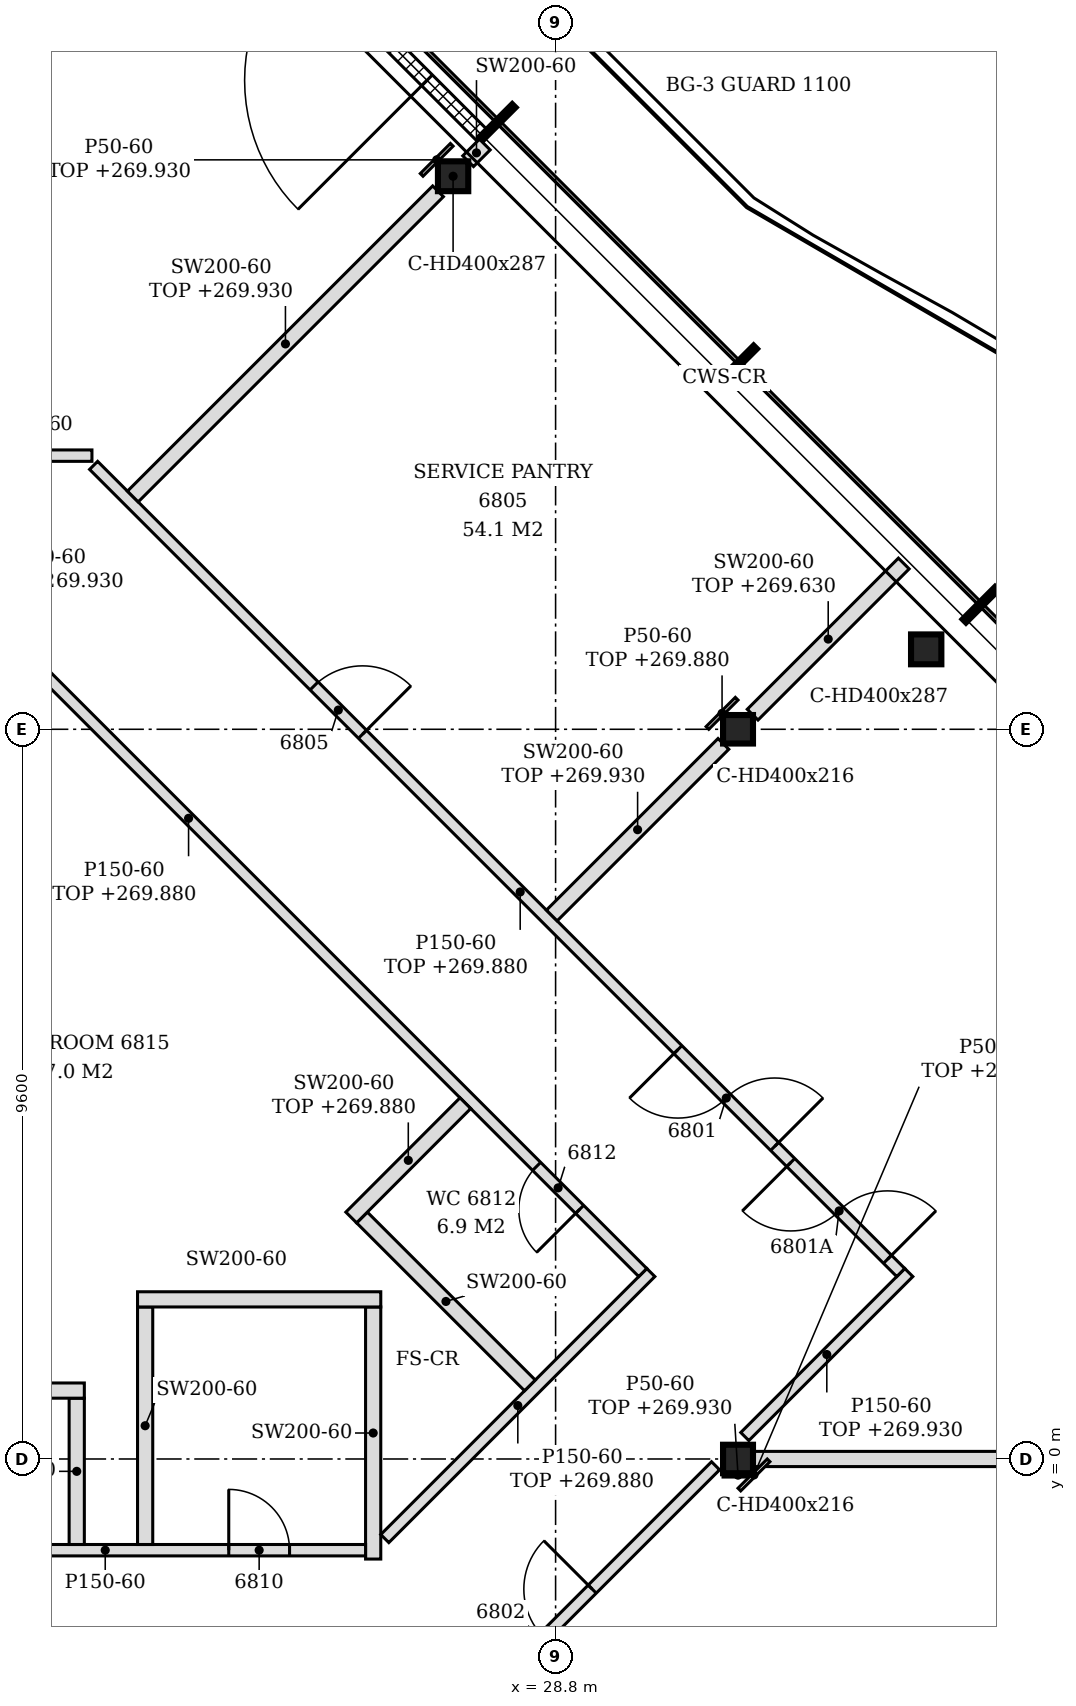
"""IFC4 building model, lengths in metres.
Left out: names, types, materials, properties, quantities, classifications, styles, units other than length and angle.
Written with IfcOpenShell. Run it as: python <this file> out.ifc"""

import sys

from ifc_helpers import new_model, si_unit, direction, frame, frame_2d, origin, origin_2d, place, context, subcontext, project, spatial, polyline, rectangle, i_section, outline, extrude, element, fill, save


model = new_model("IFC4")
c1 = context("Model", 3, precision=1e-05, world=origin(), true_north=direction((0.0, 1.0)))
c2 = subcontext(c1, "Body", "Model", "MODEL_VIEW")
j1 = project(units=[si_unit("LENGTHUNIT", "METRE"), si_unit("PLANEANGLEUNIT", "RADIAN")], contexts=[c1])
p1 = place(None, origin())
s1 = spatial("IfcSite", under=j1, at=p1, CompositionType="ELEMENT")
p2 = place(p1, origin())
s2 = spatial("IfcBuilding", under=s1, at=p2, CompositionType="ELEMENT")
p3 = place(p2, frame((0.0, 0.0, 267.0)))
s3 = spatial("IfcBuildingStorey", under=s2, at=p3, CompositionType="ELEMENT", Elevation=267.0)
for number, where, z_axis, x_axis in (
    (1, (33.676, 10.652, -0.15), (0.0, 0.0, 1.0), (1.0, 0.0, 0.0)),
    (2, (27.451, 16.876, -0.15), (0.0, 0.0, 1.0), (1.0, 0.0, 0.0)),
):
    element("IfcColumn", number, at=place(p3, frame(where, z_axis=z_axis, x_axis=x_axis)), inside=s3, PredefinedType="COLUMN", context=c2, shape_type="SweptSolid", body=[
        extrude(i_section(OverallWidth=0.399, OverallDepth=0.393, WebThickness=0.023, FlangeThickness=0.037, FilletRadius=0.015, at=origin_2d()), origin(), (0.0, 0.0, 1.0), 3.6),
    ])
for number, where, z_axis, x_axis in (
    (3, (31.2, 0.0, -0.15), (0.0, 0.0, 1.0), (1.0, 0.0, 0.0)),
    (4, (31.2, 9.6, -0.15), (0.0, 0.0, 1.0), (1.0, 0.0, 0.0)),
):
    element("IfcColumn", number, at=place(p3, frame(where, z_axis=z_axis, x_axis=x_axis)), inside=s3, PredefinedType="COLUMN", context=c2, shape_type="SweptSolid", body=[
        extrude(i_section(OverallWidth=0.394, OverallDepth=0.375, WebThickness=0.017, FlangeThickness=0.028, FilletRadius=0.015, at=origin_2d()), origin(), (0.0, 0.0, 1.0), 3.6),
    ])
p4 = place(p3, frame((27.826, 17.42, 0.0), z_axis=(0.0, 0.0, 1.0), x_axis=(-0.707079231393, 0.707134329907, 0.0)))
e5 = element("IfcWall", 5, at=p4, inside=s3, PredefinedType="NOTDEFINED", context=c2, shape_type="SweptSolid", body=[
    extrude(rectangle(XDim=4.431, YDim=0.2, at=frame_2d((2.215, 0.0))), origin(), (0.0, 0.0, 1.0), 3.45),
])
p5 = place(p4, frame((1.015, 0.0, 0.0)))
e6 = element("IfcOpeningElement", 6, at=p5, cuts=e5, PredefinedType="OPENING", context=c2, shape_type="SweptSolid", body=[
    extrude(rectangle(XDim=2.4, YDim=2.4, at=frame_2d((1.2, 1.2))), frame((0.0, 0.11, 0.0), z_axis=(0.0, -1.0, 0.0), x_axis=(1.0, 0.0, 0.0)), (0.0, 0.0, 1.0), 0.22),
])
p6 = place(p3, frame((14.322, -16.672, 0.0), z_axis=(0.0, 0.0, 1.0), x_axis=(0.707106781187, 0.707106781187, 0.0)))
e7 = element("IfcWall", 7, at=p6, inside=s3, PredefinedType="PARTITIONING", context=c2, shape_type="SweptSolid", body=[
    extrude(rectangle(XDim=23.452, YDim=0.15, at=frame_2d((11.726, 0.0))), origin(), (0.0, 0.0, 1.0), 2.73),
])
p7 = place(p6, frame((19.357, 0.0, 0.0)))
e8 = element("IfcOpeningElement", 8, at=p7, cuts=e7, PredefinedType="OPENING", context=c2, shape_type="SweptSolid", body=[
    extrude(rectangle(XDim=1.8, YDim=2.1, at=frame_2d((0.9, 1.05))), frame((0.0, 0.085, 0.0), z_axis=(0.0, -1.0, 0.0), x_axis=(1.0, 0.0, 0.0)), (0.0, 0.0, 1.0), 0.17),
])
p8 = place(p6, frame((2.975, 0.0, 0.0)))
e9 = element("IfcOpeningElement", 9, at=p8, cuts=e7, PredefinedType="OPENING", context=c2, shape_type="SweptSolid", body=[
    extrude(rectangle(XDim=0.9, YDim=2.1, at=frame_2d((0.45, 1.05))), frame((0.0, 0.085, 0.0), z_axis=(0.0, -1.0, 0.0), x_axis=(1.0, 0.0, 0.0)), (0.0, 0.0, 1.0), 0.17),
])
p9 = place(p6, frame((12.587, 0.0, 0.0)))
e10 = element("IfcOpeningElement", 10, at=p9, cuts=e7, PredefinedType="OPENING", context=c2, shape_type="SweptSolid", body=[
    extrude(rectangle(XDim=0.9, YDim=2.1, at=frame_2d((0.45, 1.05))), frame((0.0, 0.085, 0.0), z_axis=(0.0, -1.0, 0.0), x_axis=(1.0, 0.0, 0.0)), (0.0, 0.0, 1.0), 0.17),
])
p10 = place(p3, frame((26.4, -1.316, 0.0), z_axis=(0.0, 0.0, 1.0), x_axis=(0.0, 1.0, 0.0)))
e11 = element("IfcWall", 11, at=p10, inside=s3, PredefinedType="PARTITIONING", context=c2, shape_type="SweptSolid", body=[
    extrude(outline(polyline([(0.0, 0.0), (3.316, 0.0), (3.316, 3.45), (1.421, 3.45), (1.419, 2.88), (1.211, 2.88), (1.209, 3.45), (0.0, 3.45), (0.0, 0.0)])), frame((0.0, 0.1, 0.0), z_axis=(0.0, -1.0, 0.0), x_axis=(1.0, 0.0, 0.0)), (0.0, 0.0, 1.0), 0.2),
])
p11 = place(p3, frame((19.125, -1.2, 0.0), z_axis=(0.0, 0.0, 1.0), x_axis=(1.0, 0.0, 0.0)))
e12 = element("IfcWall", 12, at=p11, inside=s3, PredefinedType="PARTITIONING", context=c2, shape_type="SweptSolid", body=[
    extrude(outline(polyline([(0.0, 0.0), (7.175, 0.0), (7.175, 3.45), (0.225, 3.45), (0.223, 2.83), (0.0, 2.83), (0.0, 0.0)])), frame((0.0, 0.075, 0.0), z_axis=(0.0, -1.0, 0.0), x_axis=(1.0, 0.0, 0.0)), (0.0, 0.0, 1.0), 0.15),
])
p12 = place(p11, frame((5.375, 0.0, 0.0)))
e13 = element("IfcOpeningElement", 13, at=p12, cuts=e12, PredefinedType="OPENING", context=c2, shape_type="SweptSolid", body=[
    extrude(rectangle(XDim=0.8, YDim=2.1, at=frame_2d((0.4, 1.05))), frame((0.0, 0.085, 0.0), z_axis=(0.0, -1.0, 0.0), x_axis=(1.0, 0.0, 0.0)), (0.0, 0.0, 1.0), 0.17),
])
p13 = place(p11, frame((1.325, 0.0, 0.0)))
e14 = element("IfcOpeningElement", 14, at=p13, cuts=e12, PredefinedType="OPENING", context=c2, shape_type="SweptSolid", body=[
    extrude(rectangle(XDim=0.8, YDim=2.1, at=frame_2d((0.4, 1.05))), frame((0.0, 0.085, 0.0), z_axis=(0.0, -1.0, 0.0), x_axis=(1.0, 0.0, 0.0)), (0.0, 0.0, 1.0), 0.17),
])
p14 = place(p3, frame((22.5, -1.125, 0.0), z_axis=(0.0, 0.0, 1.0), x_axis=(0.0, 1.0, 0.0)))
e15 = element("IfcWall", 15, at=p14, inside=s3, PredefinedType="PARTITIONING", context=c2, shape_type="SweptSolid", body=[
    extrude(outline(polyline([(0.0, 0.0), (1.925, 0.0), (1.925, 3.45), (1.23, 3.45), (1.228, 2.88), (1.02, 2.88), (1.018, 3.45), (0.0, 3.45), (0.0, 0.0)])), frame((0.0, 0.1, 0.0), z_axis=(0.0, -1.0, 0.0), x_axis=(1.0, 0.0, 0.0)), (0.0, 0.0, 1.0), 0.2),
])
p15 = place(p3, frame((23.4, -1.125, 0.0), z_axis=(0.0, 0.0, 1.0), x_axis=(0.0, 1.0, 0.0)))
e16 = element("IfcWall", 16, at=p15, inside=s3, PredefinedType="PARTITIONING", context=c2, shape_type="SweptSolid", body=[
    extrude(outline(polyline([(0.0, 0.0), (3.125, 0.0), (3.125, 3.45), (1.23, 3.45), (1.228, 2.88), (1.02, 2.88), (1.018, 3.45), (0.0, 3.45), (0.0, 0.0)])), frame((0.0, 0.1, 0.0), z_axis=(0.0, -1.0, 0.0), x_axis=(1.0, 0.0, 0.0)), (0.0, 0.0, 1.0), 0.2),
])
p16 = place(p3, frame((26.553, -1.047, 0.0), z_axis=(0.0, 0.0, 1.0), x_axis=(0.707106781187, 0.707106781187, 0.0)))
e17 = element("IfcWall", 17, at=p16, inside=s3, PredefinedType="PARTITIONING", context=c2, shape_type="SweptSolid", body=[
    extrude(rectangle(XDim=4.95, YDim=0.15, at=frame_2d((2.475, 0.0))), origin(), (0.0, 0.0, 1.0), 2.88),
])
p17 = place(p3, frame((31.397, 0.0, 0.0), z_axis=(0.0, 0.0, 1.0), x_axis=(1.0, 0.0, 0.0)))
e18 = element("IfcWall", 18, at=p17, inside=s3, PredefinedType="PARTITIONING", context=c2, shape_type="SweptSolid", body=[
    extrude(outline(polyline([(0.0, 0.0), (9.053, 0.0), (9.053, 2.98), (8.653, 2.98), (8.651, 2.93), (8.353, 2.93), (8.351, 2.98), (0.0, 2.98), (0.0, 0.0)])), frame((0.0, 0.1, 0.0), z_axis=(0.0, -1.0, 0.0), x_axis=(1.0, 0.0, 0.0)), (0.0, 0.0, 1.0), 0.2),
])
p18 = place(p3, frame((31.289, 0.295, 0.0), z_axis=(0.0, 0.0, 1.0), x_axis=(0.707146786096, 0.707066774014, 0.0)))
e19 = element("IfcWall", 19, at=p18, inside=s3, PredefinedType="PARTITIONING", context=c2, shape_type="SweptSolid", body=[
    extrude(rectangle(XDim=3.051, YDim=0.15, at=frame_2d((1.526, 0.0))), origin(), (0.0, 0.0, 1.0), 2.93),
])
p19 = place(p3, frame((19.275, 0.9, 0.0), z_axis=(0.0, 0.0, 1.0), x_axis=(1.0, 0.0, 0.0)))
e20 = element("IfcWall", 20, at=p19, inside=s3, PredefinedType="PARTITIONING", context=c2, shape_type="SweptSolid", body=[
    extrude(outline(polyline([(0.0, 0.0), (3.325, 0.0), (3.325, 3.45), (0.075, 3.45), (0.073, 2.83), (0.0, 2.83), (0.0, 0.0)])), frame((0.0, 0.1, 0.0), z_axis=(0.0, -1.0, 0.0), x_axis=(1.0, 0.0, 0.0)), (0.0, 0.0, 1.0), 0.2),
])
p20 = place(p3, frame((28.462, 0.968, 0.0), z_axis=(0.0, 0.0, 1.0), x_axis=(-0.707106781187, 0.707106781187, 0.0)))
e21 = element("IfcWall", 21, at=p20, inside=s3, PredefinedType="PARTITIONING", context=c2, shape_type="SweptSolid", body=[
    extrude(rectangle(XDim=3.124, YDim=0.2, at=frame_2d((1.562, 0.0))), origin(), (0.0, 0.0, 1.0), 3.45),
])
p21 = place(p3, frame((23.3, 2.1, 0.0), z_axis=(0.0, 0.0, 1.0), x_axis=(1.0, 0.0, 0.0)))
e22 = element("IfcWall", 22, at=p21, inside=s3, PredefinedType="PARTITIONING", context=c2, shape_type="SweptSolid", body=[
    extrude(rectangle(XDim=3.2, YDim=0.2, at=frame_2d((1.6, 0.0))), origin(), (0.0, 0.0, 1.0), 3.45),
])
p22 = place(p3, frame((29.947, 2.453, 0.0), z_axis=(0.0, 0.0, 1.0), x_axis=(-0.707098603185, 0.707114959093, 0.0)))
e23 = element("IfcWall", 23, at=p22, inside=s3, PredefinedType="PARTITIONING", context=c2, shape_type="SweptSolid", body=[
    extrude(rectangle(XDim=14.927, YDim=0.15, at=frame_2d((7.463, 0.0))), origin(), (0.0, 0.0, 1.0), 2.88),
])
p23 = place(p22, frame((1.175, 0.0, 0.0)))
e24 = element("IfcOpeningElement", 24, at=p23, cuts=e23, PredefinedType="OPENING", context=c2, shape_type="SweptSolid", body=[
    extrude(rectangle(XDim=0.8, YDim=2.1, at=frame_2d((0.4, 1.05))), frame((0.0, 0.085, 0.0), z_axis=(0.0, -1.0, 0.0), x_axis=(1.0, 0.0, 0.0)), (0.0, 0.0, 1.0), 0.17),
])
p24 = place(p3, frame((33.341, 2.453, 0.0), z_axis=(0.0, 0.0, 1.0), x_axis=(-0.707098652635, 0.707114909645, 0.0)))
e25 = element("IfcWall", 25, at=p24, inside=s3, PredefinedType="PARTITIONING", context=c2, shape_type="SweptSolid", body=[
    extrude(rectangle(XDim=15.018, YDim=0.15, at=frame_2d((7.509, 0.0))), origin(), (0.0, 0.0, 1.0), 2.88),
])
p25 = place(p24, frame((2.347, 0.0, 0.0)))
e26 = element("IfcOpeningElement", 26, at=p25, cuts=e25, PredefinedType="OPENING", context=c2, shape_type="SweptSolid", body=[
    extrude(rectangle(XDim=1.8, YDim=2.1, at=frame_2d((0.9, 1.05))), frame((0.0, 0.085, 0.0), z_axis=(0.0, -1.0, 0.0), x_axis=(1.0, 0.0, 0.0)), (0.0, 0.0, 1.0), 0.17),
])
p26 = place(p24, frame((0.247, 0.0, 0.0)))
e27 = element("IfcOpeningElement", 27, at=p26, cuts=e25, PredefinedType="OPENING", context=c2, shape_type="SweptSolid", body=[
    extrude(rectangle(XDim=1.8, YDim=2.1, at=frame_2d((0.9, 1.05))), frame((0.0, 0.085, 0.0), z_axis=(0.0, -1.0, 0.0), x_axis=(1.0, 0.0, 0.0)), (0.0, 0.0, 1.0), 0.17),
])
p27 = place(p24, frame((10.015, 0.0, 0.0)))
e28 = element("IfcOpeningElement", 28, at=p27, cuts=e25, PredefinedType="OPENING", context=c2, shape_type="SweptSolid", body=[
    extrude(rectangle(XDim=0.9, YDim=2.1, at=frame_2d((0.45, 1.05))), frame((0.0, 0.085, 0.0), z_axis=(0.0, -1.0, 0.0), x_axis=(1.0, 0.0, 0.0)), (0.0, 0.0, 1.0), 0.17),
])
p28 = place(p3, frame((26.111, 3.177, 0.0), z_axis=(0.0, 0.0, 1.0), x_axis=(0.70658957541, 0.707623608935, 0.0)))
e29 = element("IfcWall", 29, at=p28, inside=s3, PredefinedType="PARTITIONING", context=c2, shape_type="SweptSolid", body=[
    extrude(rectangle(XDim=2.125, YDim=0.2, at=frame_2d((1.062, 0.0))), origin(), (0.0, 0.0, 1.0), 2.88),
])
p29 = place(p3, frame((28.75, 7.15, 0.0), z_axis=(0.0, 0.0, 1.0), x_axis=(0.707106781187, 0.707106781187, 0.0)))
e30 = element("IfcWall", 30, at=p29, inside=s3, PredefinedType="PARTITIONING", context=c2, shape_type="SweptSolid", body=[
    extrude(rectangle(XDim=3.193, YDim=0.2, at=frame_2d((1.597, 0.0))), origin(), (0.0, 0.0, 1.0), 2.93),
])
p30 = place(p3, frame((31.392, 9.792, 0.0), z_axis=(0.0, 0.0, 1.0), x_axis=(0.707106781187, 0.707106781187, 0.0)))
e31 = element("IfcWall", 31, at=p30, inside=s3, PredefinedType="PARTITIONING", context=c2, shape_type="SweptSolid", body=[
    extrude(rectangle(XDim=2.812, YDim=0.2, at=frame_2d((1.406, 0.0))), origin(), (0.0, 0.0, 1.0), 2.63),
])
p31 = place(p3, frame((23.238, 12.662, 0.0), z_axis=(0.0, 0.0, 1.0), x_axis=(0.707128276734, 0.707085284986, 0.0)))
e32 = element("IfcWall", 32, at=p31, inside=s3, PredefinedType="PARTITIONING", context=c2, shape_type="SweptSolid", body=[
    extrude(rectangle(XDim=5.679, YDim=0.2, at=frame_2d((2.839, 0.0))), origin(), (0.0, 0.0, 1.0), 2.93),
])
p32 = place(p3, frame((19.397, 13.2, 0.0), z_axis=(0.0, 0.0, 1.0), x_axis=(1.0, 0.0, 0.0)))
e33 = element("IfcWall", 33, at=p32, inside=s3, PredefinedType="PARTITIONING", context=c2, shape_type="SweptSolid", body=[
    extrude(rectangle(XDim=3.303, YDim=0.15, at=frame_2d((1.652, 0.0))), origin(), (0.0, 0.0, 1.0), 3.45),
])
p33 = place(p32, frame((1.05, 0.0, 0.0)))
e34 = element("IfcOpeningElement", 34, at=p33, cuts=e33, PredefinedType="OPENING", context=c2, shape_type="SweptSolid", body=[
    extrude(rectangle(XDim=0.9, YDim=2.1, at=frame_2d((0.45, 1.05))), frame((0.0, 0.085, 0.0), z_axis=(0.0, -1.0, 0.0), x_axis=(1.0, 0.0, 0.0)), (0.0, 0.0, 1.0), 0.17),
])
p34 = place(p3, frame((27.65, 17.073, 0.0), z_axis=(0.0, 0.0, 1.0), x_axis=(0.707106781187, 0.707106781187, 0.0)))
e35 = element("IfcWall", 35, at=p34, inside=s3, PredefinedType="PARTITIONING", context=c2, shape_type="SweptSolid", body=[
    extrude(rectangle(XDim=0.31, YDim=0.2, at=frame_2d((0.155, 0.0))), origin(), (0.0, 0.0, 1.0), 3.45),
])
p35 = place(p3, frame((31.218, -0.402, 0.0), z_axis=(0.0, 0.0, 1.0), x_axis=(0.707106781187, 0.707106781187, 0.0)))
e36 = element("IfcWall", 36, at=p35, inside=s3, PredefinedType="PARTITIONING", context=c2, shape_type="SweptSolid", body=[
    extrude(rectangle(XDim=0.544, YDim=0.05, at=frame_2d((0.272, 0.0))), origin(), (0.0, 0.0, 1.0), 2.93),
])
p36 = place(p3, frame((31.003, -0.212, 0.0), z_axis=(0.0, 0.0, 1.0), x_axis=(1.0, 0.0, 0.0)))
e37 = element("IfcWall", 37, at=p36, inside=s3, PredefinedType="PARTITIONING", context=c2, shape_type="SweptSolid", body=[
    extrude(rectangle(XDim=0.394, YDim=0.05, at=frame_2d((0.197, 0.0))), origin(), (0.0, 0.0, 1.0), 2.93),
])
p37 = place(p3, frame((30.798, 9.618, 0.0), z_axis=(0.0, 0.0, 1.0), x_axis=(0.707106781187, 0.707106781187, 0.0)))
e38 = element("IfcWall", 38, at=p37, inside=s3, PredefinedType="PARTITIONING", context=c2, shape_type="SweptSolid", body=[
    extrude(rectangle(XDim=0.544, YDim=0.05, at=frame_2d((0.272, 0.0))), origin(), (0.0, 0.0, 1.0), 2.88),
])
p38 = place(p3, frame((27.038, 16.893, 0.0), z_axis=(0.0, 0.0, 1.0), x_axis=(0.707106781187, 0.707106781187, 0.0)))
e39 = element("IfcWall", 39, at=p38, inside=s3, PredefinedType="PARTITIONING", context=c2, shape_type="SweptSolid", body=[
    extrude(rectangle(XDim=0.56, YDim=0.05, at=frame_2d((0.28, 0.0))), origin(), (0.0, 0.0, 1.0), 2.93),
])
p39 = place(p5, origin())
e40 = element("IfcDoor", 40, at=p39, inside=s3, OperationType="SINGLE_SWING_LEFT", PredefinedType="DOOR", context=c2, shape_type="SweptSolid", body=[
    extrude(rectangle(XDim=2.4, YDim=2.4, at=frame_2d((1.2, 1.2))), frame((0.0, 0.025, 0.0), z_axis=(0.0, -1.0, 0.0), x_axis=(1.0, 0.0, 0.0)), (0.0, 0.0, 1.0), 0.05),
])
fill(e6, e40)
p40 = place(p25, frame((1.8, 0.0, 0.0), z_axis=(0.0, 0.0, 1.0), x_axis=(-1.0, 0.0, 0.0)))
e41 = element("IfcDoor", 41, at=p40, inside=s3, OperationType="DOUBLE_DOOR_SINGLE_SWING", PredefinedType="DOOR", context=c2, shape_type="SweptSolid", body=[
    extrude(rectangle(XDim=1.8, YDim=2.1, at=frame_2d((0.9, 1.05))), frame((0.0, 0.025, 0.0), z_axis=(0.0, -1.0, 0.0), x_axis=(1.0, 0.0, 0.0)), (0.0, 0.0, 1.0), 0.05),
])
fill(e26, e41)
p41 = place(p26, frame((1.8, 0.0, 0.0), z_axis=(0.0, 0.0, 1.0), x_axis=(-1.0, 0.0, 0.0)))
e42 = element("IfcDoor", 42, at=p41, inside=s3, OperationType="DOUBLE_DOOR_SINGLE_SWING", PredefinedType="DOOR", context=c2, shape_type="SweptSolid", body=[
    extrude(rectangle(XDim=1.8, YDim=2.1, at=frame_2d((0.9, 1.05))), frame((0.0, 0.025, 0.0), z_axis=(0.0, -1.0, 0.0), x_axis=(1.0, 0.0, 0.0)), (0.0, 0.0, 1.0), 0.05),
])
fill(e27, e42)
p42 = place(p7, frame((1.8, 0.0, 0.0), z_axis=(0.0, 0.0, 1.0), x_axis=(-1.0, 0.0, 0.0)))
e43 = element("IfcDoor", 43, at=p42, inside=s3, OperationType="DOUBLE_DOOR_SINGLE_SWING", PredefinedType="DOOR", context=c2, shape_type="SweptSolid", body=[
    extrude(rectangle(XDim=1.8, YDim=2.1, at=frame_2d((0.9, 1.05))), frame((0.0, 0.025, 0.0), z_axis=(0.0, -1.0, 0.0), x_axis=(1.0, 0.0, 0.0)), (0.0, 0.0, 1.0), 0.05),
])
fill(e8, e43)
p43 = place(p27, frame((0.9, 0.0, 0.0), z_axis=(0.0, 0.0, 1.0), x_axis=(-1.0, 0.0, 0.0)))
e44 = element("IfcDoor", 44, at=p43, inside=s3, OperationType="SINGLE_SWING_RIGHT", PredefinedType="DOOR", context=c2, shape_type="SweptSolid", body=[
    extrude(rectangle(XDim=0.9, YDim=2.1, at=frame_2d((0.45, 1.05))), frame((0.0, 0.025, 0.0), z_axis=(0.0, -1.0, 0.0), x_axis=(1.0, 0.0, 0.0)), (0.0, 0.0, 1.0), 0.05),
])
fill(e28, e44)
p44 = place(p12, origin())
e45 = element("IfcDoor", 45, at=p44, inside=s3, OperationType="SINGLE_SWING_LEFT", PredefinedType="DOOR", context=c2, shape_type="SweptSolid", body=[
    extrude(rectangle(XDim=0.8, YDim=2.1, at=frame_2d((0.4, 1.05))), frame((0.0, 0.025, 0.0), z_axis=(0.0, -1.0, 0.0), x_axis=(1.0, 0.0, 0.0)), (0.0, 0.0, 1.0), 0.05),
])
fill(e13, e45)
p45 = place(p23, origin())
e46 = element("IfcDoor", 46, at=p45, inside=s3, OperationType="SINGLE_SWING_LEFT", PredefinedType="DOOR", context=c2, shape_type="SweptSolid", body=[
    extrude(rectangle(XDim=0.8, YDim=2.1, at=frame_2d((0.4, 1.05))), frame((0.0, 0.025, 0.0), z_axis=(0.0, -1.0, 0.0), x_axis=(1.0, 0.0, 0.0)), (0.0, 0.0, 1.0), 0.05),
])
fill(e24, e46)
save(model, sys.argv[1])
